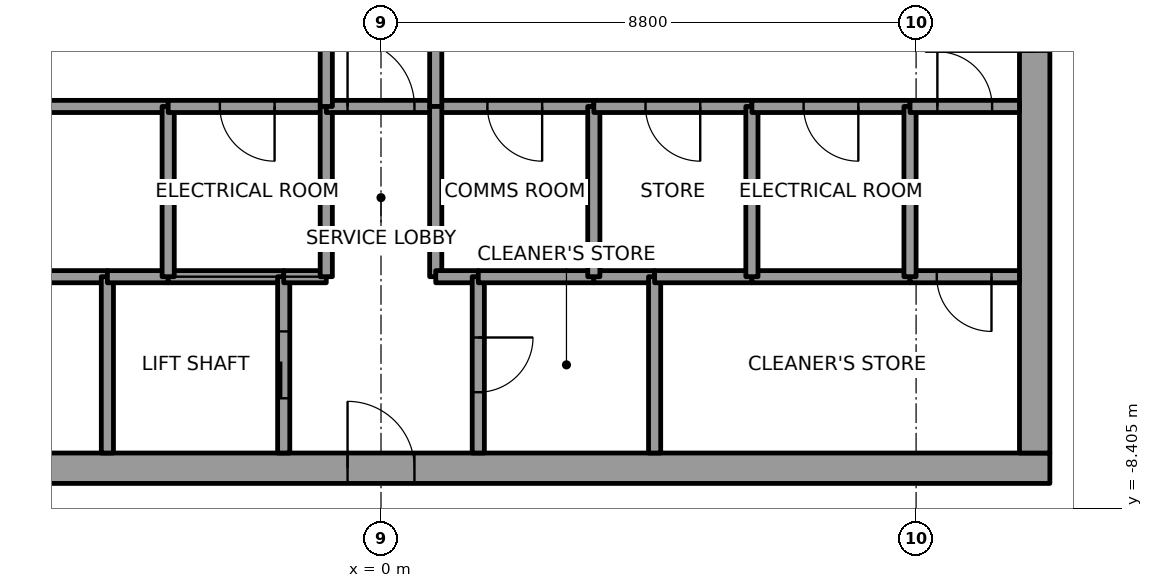
"""IFC4 building model, lengths in metres.
Left out: names, types, materials, properties, quantities, classifications, styles, units other than length and angle.
Written with IfcOpenShell. Run it as: python <this file> out.ifc"""

import sys

from ifc_helpers import new_model, si_unit, direction, frame, frame_2d, origin, place, context, subcontext, project, spatial, rectangle, extrude, element, fill, save


model = new_model("IFC4")
c1 = context("Model", 3, precision=1e-05, world=origin(), true_north=direction((0.0, 1.0)))
c2 = subcontext(c1, "Body", "Model", "MODEL_VIEW")
j1 = project(units=[si_unit("LENGTHUNIT", "METRE"), si_unit("PLANEANGLEUNIT", "RADIAN")], contexts=[c1])
p1 = place(None, origin())
s1 = spatial("IfcSite", under=j1, at=p1, CompositionType="ELEMENT")
p2 = place(p1, origin())
s2 = spatial("IfcBuilding", under=s1, at=p2, CompositionType="ELEMENT")
p3 = place(p2, frame((0.0, 0.0, 355.6)))
s3 = spatial("IfcBuildingStorey", under=s2, at=p3, CompositionType="ELEMENT", Elevation=355.6)
p4 = place(p3, frame((-11.0, -7.75, 0.0), z_axis=(0.0, 0.0, 1.0), x_axis=(1.0, 0.0, 0.0)))
e1 = element("IfcWall", 1, at=p4, inside=s3, PredefinedType="SHEAR", context=c2, shape_type="SweptSolid", body=[
    extrude(rectangle(XDim=22.0, YDim=0.5, at=frame_2d((11.0, 0.0))), origin(), (0.0, 0.0, 1.0), 5.4),
])
p5 = place(p4, frame((10.45, 0.0, 0.0)))
e2 = element("IfcOpeningElement", 2, at=p5, cuts=e1, PredefinedType="OPENING", context=c2, shape_type="SweptSolid", body=[
    extrude(rectangle(XDim=1.1, YDim=2.1, at=frame_2d((0.55, 1.05))), frame((0.0, 0.25, 0.0), z_axis=(0.0, -1.0, 0.0), x_axis=(1.0, 0.0, 0.0)), (0.0, 0.0, 1.0), 0.5),
])
p6 = place(p3, frame((10.75, -7.5, 0.0), z_axis=(0.0, 0.0, 1.0), x_axis=(0.0, 1.0, 0.0)))
e3 = element("IfcWall", 3, at=p6, inside=s3, PredefinedType="SHEAR", context=c2, shape_type="SweptSolid", body=[
    extrude(rectangle(XDim=15.0, YDim=0.5, at=frame_2d((7.5, 0.0))), origin(), (0.0, 0.0, 1.0), 5.4),
])
p7 = place(p6, frame((6.6, 0.0, 0.0)))
e4 = element("IfcOpeningElement", 4, at=p7, cuts=e3, PredefinedType="OPENING", context=c2, shape_type="SweptSolid", body=[
    extrude(rectangle(XDim=1.8, YDim=2.1, at=frame_2d((0.9, 1.05))), frame((0.0, 0.25, 0.0), z_axis=(0.0, -1.0, 0.0), x_axis=(1.0, 0.0, 0.0)), (0.0, 0.0, 1.0), 0.5),
])
p8 = place(p3, frame((-8.7, -4.6, 0.0), z_axis=(0.0, 0.0, 1.0), x_axis=(1.0, 0.0, 0.0)))
e5 = element("IfcWall", 5, at=p8, inside=s3, PredefinedType="SOLIDWALL", context=c2, shape_type="SweptSolid", body=[
    extrude(rectangle(XDim=4.2, YDim=0.2, at=frame_2d((2.1, 0.0))), origin(), (0.0, 0.0, 1.0), 5.25),
])
p9 = place(p3, frame((-3.5, -1.8, 0.0), z_axis=(0.0, 0.0, 1.0), x_axis=(-1.0, 0.0, 0.0)))
e6 = element("IfcWall", 6, at=p9, inside=s3, PredefinedType="SOLIDWALL", context=c2, shape_type="SweptSolid", body=[
    extrude(rectangle(XDim=5.2, YDim=0.2, at=frame_2d((2.6, 0.0))), origin(), (0.0, 0.0, 1.0), 5.25),
])
p10 = place(p9, frame((2.15, 0.0, 0.0)))
e7 = element("IfcOpeningElement", 7, at=p10, cuts=e6, PredefinedType="OPENING", context=c2, shape_type="SweptSolid", body=[
    extrude(rectangle(XDim=0.9, YDim=2.1, at=frame_2d((0.45, 1.05))), frame((0.0, 0.1, 0.0), z_axis=(0.0, -1.0, 0.0), x_axis=(1.0, 0.0, 0.0)), (0.0, 0.0, 1.0), 0.2),
])
p11 = place(p3, frame((-4.5, -4.6, 0.0), z_axis=(0.0, 0.0, 1.0), x_axis=(0.0, -1.0, 0.0)))
e8 = element("IfcWall", 8, at=p11, inside=s3, PredefinedType="SOLIDWALL", context=c2, shape_type="SweptSolid", body=[
    extrude(rectangle(XDim=2.9, YDim=0.2, at=frame_2d((1.45, 0.0))), origin(), (0.0, 0.0, 1.0), 5.25),
])
p12 = place(p3, frame((-4.5, -4.6, 0.0), z_axis=(0.0, 0.0, 1.0), x_axis=(1.0, 0.0, 0.0)))
e9 = element("IfcWall", 9, at=p12, inside=s3, PredefinedType="SOLIDWALL", context=c2, shape_type="SweptSolid", body=[
    extrude(rectangle(XDim=1.0, YDim=0.2, at=frame_2d((0.5, 0.0))), origin(), (0.0, 0.0, 1.0), 5.25),
])
p13 = place(p3, frame((-3.5, -4.6, 0.0), z_axis=(0.0, 0.0, 1.0), x_axis=(1.0, 0.0, 0.0)))
e10 = element("IfcWall", 10, at=p13, inside=s3, PredefinedType="SOLIDWALL", context=c2, shape_type="SweptSolid", body=[
    extrude(rectangle(XDim=1.9, YDim=0.2, at=frame_2d((0.95, 0.0))), origin(), (0.0, 0.0, 1.0), 5.25),
])
p14 = place(p3, frame((-3.5, -4.6, 0.0), z_axis=(0.0, 0.0, 1.0), x_axis=(0.0, 1.0, 0.0)))
e11 = element("IfcWall", 11, at=p14, inside=s3, PredefinedType="SOLIDWALL", context=c2, shape_type="SweptSolid", body=[
    extrude(rectangle(XDim=2.8, YDim=0.2, at=frame_2d((1.4, 0.0))), origin(), (0.0, 0.0, 1.0), 5.25),
])
p15 = place(p3, frame((-0.9, -1.8, 0.0), z_axis=(0.0, 0.0, 1.0), x_axis=(-1.0, 0.0, 0.0)))
e12 = element("IfcWall", 12, at=p15, inside=s3, PredefinedType="SOLIDWALL", context=c2, shape_type="SweptSolid", body=[
    extrude(rectangle(XDim=2.6, YDim=0.2, at=frame_2d((1.3, 0.0))), origin(), (0.0, 0.0, 1.0), 5.25),
])
p16 = place(p15, frame((0.85, 0.0, 0.0)))
e13 = element("IfcOpeningElement", 13, at=p16, cuts=e12, PredefinedType="OPENING", context=c2, shape_type="SweptSolid", body=[
    extrude(rectangle(XDim=0.9, YDim=2.1, at=frame_2d((0.45, 1.05))), frame((0.0, 0.1, 0.0), z_axis=(0.0, -1.0, 0.0), x_axis=(1.0, 0.0, 0.0)), (0.0, 0.0, 1.0), 0.2),
])
p17 = place(p3, frame((-1.6, -7.5, 0.0), z_axis=(0.0, 0.0, 1.0), x_axis=(0.0, 1.0, 0.0)))
e14 = element("IfcWall", 14, at=p17, inside=s3, PredefinedType="SOLIDWALL", context=c2, shape_type="SweptSolid", body=[
    extrude(rectangle(XDim=2.9, YDim=0.2, at=frame_2d((1.45, 0.0))), origin(), (0.0, 0.0, 1.0), 5.25),
])
p18 = place(p17, frame((0.9, 0.0, 0.0)))
e15 = element("IfcOpeningElement", 15, at=p18, cuts=e14, PredefinedType="OPENING", context=c2, shape_type="SweptSolid", body=[
    extrude(rectangle(XDim=1.1, YDim=2.1, at=frame_2d((0.55, 1.05))), frame((0.0, 0.1, 0.0), z_axis=(0.0, -1.0, 0.0), x_axis=(1.0, 0.0, 0.0)), (0.0, 0.0, 1.0), 0.2),
])
p19 = place(p3, frame((-1.6, -4.6, 0.0), z_axis=(0.0, 0.0, 1.0), x_axis=(1.0, 0.0, 0.0)))
e16 = element("IfcWall", 16, at=p19, inside=s3, PredefinedType="SOLIDWALL", context=c2, shape_type="SweptSolid", body=[
    extrude(rectangle(XDim=0.7, YDim=0.2, at=frame_2d((0.35, 0.0))), origin(), (0.0, 0.0, 1.0), 5.25),
])
p20 = place(p3, frame((-0.9, -4.6, 0.0), z_axis=(0.0, 0.0, 1.0), x_axis=(0.0, 1.0, 0.0)))
e17 = element("IfcWall", 17, at=p20, inside=s3, PredefinedType="SOLIDWALL", context=c2, shape_type="SweptSolid", body=[
    extrude(rectangle(XDim=2.8, YDim=0.2, at=frame_2d((1.4, 0.0))), origin(), (0.0, 0.0, 1.0), 5.25),
])
p21 = place(p3, frame((-0.9, -1.8, 0.0), z_axis=(0.0, 0.0, 1.0), x_axis=(1.0, 0.0, 0.0)))
e18 = element("IfcWall", 18, at=p21, inside=s3, PredefinedType="SOLIDWALL", context=c2, shape_type="SweptSolid", body=[
    extrude(rectangle(XDim=1.8, YDim=0.2, at=frame_2d((0.9, 0.0))), origin(), (0.0, 0.0, 1.0), 5.25),
])
p22 = place(p21, frame((0.35, 0.0, 0.0)))
e19 = element("IfcOpeningElement", 19, at=p22, cuts=e18, PredefinedType="OPENING", context=c2, shape_type="SweptSolid", body=[
    extrude(rectangle(XDim=1.1, YDim=2.1, at=frame_2d((0.55, 1.05))), frame((0.0, 0.1, 0.0), z_axis=(0.0, -1.0, 0.0), x_axis=(1.0, 0.0, 0.0)), (0.0, 0.0, 1.0), 0.2),
])
p23 = place(p3, frame((-0.9, 1.8, 0.0), z_axis=(0.0, 0.0, 1.0), x_axis=(0.0, -1.0, 0.0)))
e20 = element("IfcWall", 20, at=p23, inside=s3, PredefinedType="SOLIDWALL", context=c2, shape_type="SweptSolid", body=[
    extrude(rectangle(XDim=3.6, YDim=0.2, at=frame_2d((1.8, 0.0))), origin(), (0.0, 0.0, 1.0), 5.25),
])
p24 = place(p23, frame((1.05, 0.0, 0.0)))
e21 = element("IfcOpeningElement", 21, at=p24, cuts=e20, PredefinedType="OPENING", context=c2, shape_type="SweptSolid", body=[
    extrude(rectangle(XDim=1.5, YDim=2.1, at=frame_2d((0.75, 1.05))), frame((0.0, 0.1, 0.0), z_axis=(0.0, -1.0, 0.0), x_axis=(1.0, 0.0, 0.0)), (0.0, 0.0, 1.0), 0.2),
])
p25 = place(p3, frame((3.5, -1.8, 0.0), z_axis=(0.0, 0.0, 1.0), x_axis=(-1.0, 0.0, 0.0)))
e22 = element("IfcWall", 22, at=p25, inside=s3, PredefinedType="SOLIDWALL", context=c2, shape_type="SweptSolid", body=[
    extrude(rectangle(XDim=2.6, YDim=0.2, at=frame_2d((1.3, 0.0))), origin(), (0.0, 0.0, 1.0), 5.25),
])
p26 = place(p25, frame((0.85, 0.0, 0.0)))
e23 = element("IfcOpeningElement", 23, at=p26, cuts=e22, PredefinedType="OPENING", context=c2, shape_type="SweptSolid", body=[
    extrude(rectangle(XDim=0.9, YDim=2.1, at=frame_2d((0.45, 1.05))), frame((0.0, 0.1, 0.0), z_axis=(0.0, -1.0, 0.0), x_axis=(1.0, 0.0, 0.0)), (0.0, 0.0, 1.0), 0.2),
])
p27 = place(p3, frame((0.9, -1.8, 0.0), z_axis=(0.0, 0.0, 1.0), x_axis=(0.0, 1.0, 0.0)))
e24 = element("IfcWall", 24, at=p27, inside=s3, PredefinedType="SOLIDWALL", context=c2, shape_type="SweptSolid", body=[
    extrude(rectangle(XDim=3.6, YDim=0.2, at=frame_2d((1.8, 0.0))), origin(), (0.0, 0.0, 1.0), 5.25),
])
p28 = place(p27, frame((1.05, 0.0, 0.0)))
e25 = element("IfcOpeningElement", 25, at=p28, cuts=e24, PredefinedType="OPENING", context=c2, shape_type="SweptSolid", body=[
    extrude(rectangle(XDim=1.5, YDim=2.1, at=frame_2d((0.75, 1.05))), frame((0.0, 0.1, 0.0), z_axis=(0.0, -1.0, 0.0), x_axis=(1.0, 0.0, 0.0)), (0.0, 0.0, 1.0), 0.2),
])
p29 = place(p3, frame((0.9, -1.8, 0.0), z_axis=(0.0, 0.0, 1.0), x_axis=(0.0, -1.0, 0.0)))
e26 = element("IfcWall", 26, at=p29, inside=s3, PredefinedType="SOLIDWALL", context=c2, shape_type="SweptSolid", body=[
    extrude(rectangle(XDim=2.8, YDim=0.2, at=frame_2d((1.4, 0.0))), origin(), (0.0, 0.0, 1.0), 5.25),
])
p30 = place(p3, frame((0.9, -4.6, 0.0), z_axis=(0.0, 0.0, 1.0), x_axis=(1.0, 0.0, 0.0)))
e27 = element("IfcWall", 27, at=p30, inside=s3, PredefinedType="SOLIDWALL", context=c2, shape_type="SweptSolid", body=[
    extrude(rectangle(XDim=0.7, YDim=0.2, at=frame_2d((0.35, 0.0))), origin(), (0.0, 0.0, 1.0), 5.25),
])
p31 = place(p3, frame((1.6, -4.6, 0.0), z_axis=(0.0, 0.0, 1.0), x_axis=(0.0, -1.0, 0.0)))
e28 = element("IfcWall", 28, at=p31, inside=s3, PredefinedType="SOLIDWALL", context=c2, shape_type="SweptSolid", body=[
    extrude(rectangle(XDim=2.9, YDim=0.2, at=frame_2d((1.45, 0.0))), origin(), (0.0, 0.0, 1.0), 5.25),
])
p32 = place(p31, frame((1.0, 0.0, 0.0)))
e29 = element("IfcOpeningElement", 29, at=p32, cuts=e28, PredefinedType="OPENING", context=c2, shape_type="SweptSolid", body=[
    extrude(rectangle(XDim=0.9, YDim=2.1, at=frame_2d((0.45, 1.05))), frame((0.0, 0.1, 0.0), z_axis=(0.0, -1.0, 0.0), x_axis=(1.0, 0.0, 0.0)), (0.0, 0.0, 1.0), 0.2),
])
p33 = place(p3, frame((1.6, -4.6, 0.0), z_axis=(0.0, 0.0, 1.0), x_axis=(1.0, 0.0, 0.0)))
e30 = element("IfcWall", 30, at=p33, inside=s3, PredefinedType="SOLIDWALL", context=c2, shape_type="SweptSolid", body=[
    extrude(rectangle(XDim=1.9, YDim=0.2, at=frame_2d((0.95, 0.0))), origin(), (0.0, 0.0, 1.0), 5.25),
])
p34 = place(p3, frame((3.5, -4.6, 0.0), z_axis=(0.0, 0.0, 1.0), x_axis=(1.0, 0.0, 0.0)))
e31 = element("IfcWall", 31, at=p34, inside=s3, PredefinedType="SOLIDWALL", context=c2, shape_type="SweptSolid", body=[
    extrude(rectangle(XDim=1.0, YDim=0.2, at=frame_2d((0.5, 0.0))), origin(), (0.0, 0.0, 1.0), 5.25),
])
p35 = place(p3, frame((3.5, -4.6, 0.0), z_axis=(0.0, 0.0, 1.0), x_axis=(0.0, 1.0, 0.0)))
e32 = element("IfcWall", 32, at=p35, inside=s3, PredefinedType="SOLIDWALL", context=c2, shape_type="SweptSolid", body=[
    extrude(rectangle(XDim=2.8, YDim=0.2, at=frame_2d((1.4, 0.0))), origin(), (0.0, 0.0, 1.0), 5.25),
])
p36 = place(p3, frame((6.1, -1.8, 0.0), z_axis=(0.0, 0.0, 1.0), x_axis=(-1.0, 0.0, 0.0)))
e33 = element("IfcWall", 33, at=p36, inside=s3, PredefinedType="SOLIDWALL", context=c2, shape_type="SweptSolid", body=[
    extrude(rectangle(XDim=2.6, YDim=0.2, at=frame_2d((1.3, 0.0))), origin(), (0.0, 0.0, 1.0), 5.25),
])
p37 = place(p36, frame((0.85, 0.0, 0.0)))
e34 = element("IfcOpeningElement", 34, at=p37, cuts=e33, PredefinedType="OPENING", context=c2, shape_type="SweptSolid", body=[
    extrude(rectangle(XDim=0.9, YDim=2.1, at=frame_2d((0.45, 1.05))), frame((0.0, 0.1, 0.0), z_axis=(0.0, -1.0, 0.0), x_axis=(1.0, 0.0, 0.0)), (0.0, 0.0, 1.0), 0.2),
])
p38 = place(p3, frame((4.5, -4.6, 0.0), z_axis=(0.0, 0.0, 1.0), x_axis=(0.0, -1.0, 0.0)))
e35 = element("IfcWall", 35, at=p38, inside=s3, PredefinedType="SOLIDWALL", context=c2, shape_type="SweptSolid", body=[
    extrude(rectangle(XDim=2.9, YDim=0.2, at=frame_2d((1.45, 0.0))), origin(), (0.0, 0.0, 1.0), 5.25),
])
p39 = place(p3, frame((4.5, -4.6, 0.0), z_axis=(0.0, 0.0, 1.0), x_axis=(1.0, 0.0, 0.0)))
e36 = element("IfcWall", 36, at=p39, inside=s3, PredefinedType="SOLIDWALL", context=c2, shape_type="SweptSolid", body=[
    extrude(rectangle(XDim=1.6, YDim=0.2, at=frame_2d((0.8, 0.0))), origin(), (0.0, 0.0, 1.0), 5.25),
])
p40 = place(p3, frame((6.1, -4.6, 0.0), z_axis=(0.0, 0.0, 1.0), x_axis=(1.0, 0.0, 0.0)))
e37 = element("IfcWall", 37, at=p40, inside=s3, PredefinedType="SOLIDWALL", context=c2, shape_type="SweptSolid", body=[
    extrude(rectangle(XDim=2.6, YDim=0.2, at=frame_2d((1.3, 0.0))), origin(), (0.0, 0.0, 1.0), 5.25),
])
p41 = place(p3, frame((6.1, -4.6, 0.0), z_axis=(0.0, 0.0, 1.0), x_axis=(0.0, 1.0, 0.0)))
e38 = element("IfcWall", 38, at=p41, inside=s3, PredefinedType="SOLIDWALL", context=c2, shape_type="SweptSolid", body=[
    extrude(rectangle(XDim=2.8, YDim=0.2, at=frame_2d((1.4, 0.0))), origin(), (0.0, 0.0, 1.0), 5.25),
])
p42 = place(p3, frame((8.7, -1.8, 0.0), z_axis=(0.0, 0.0, 1.0), x_axis=(-1.0, 0.0, 0.0)))
e39 = element("IfcWall", 39, at=p42, inside=s3, PredefinedType="SOLIDWALL", context=c2, shape_type="SweptSolid", body=[
    extrude(rectangle(XDim=2.6, YDim=0.2, at=frame_2d((1.3, 0.0))), origin(), (0.0, 0.0, 1.0), 5.25),
])
p43 = place(p42, frame((0.85, 0.0, 0.0)))
e40 = element("IfcOpeningElement", 40, at=p43, cuts=e39, PredefinedType="OPENING", context=c2, shape_type="SweptSolid", body=[
    extrude(rectangle(XDim=0.9, YDim=2.1, at=frame_2d((0.45, 1.05))), frame((0.0, 0.1, 0.0), z_axis=(0.0, -1.0, 0.0), x_axis=(1.0, 0.0, 0.0)), (0.0, 0.0, 1.0), 0.2),
])
p44 = place(p3, frame((10.5, -4.6, 0.0), z_axis=(0.0, 0.0, 1.0), x_axis=(-1.0, 0.0, 0.0)))
e41 = element("IfcWall", 41, at=p44, inside=s3, PredefinedType="SOLIDWALL", context=c2, shape_type="SweptSolid", body=[
    extrude(rectangle(XDim=1.8, YDim=0.2, at=frame_2d((0.9, 0.0))), origin(), (0.0, 0.0, 1.0), 5.25),
])
p45 = place(p44, frame((0.46, 0.0, 0.0)))
e42 = element("IfcOpeningElement", 42, at=p45, cuts=e41, PredefinedType="OPENING", context=c2, shape_type="SweptSolid", body=[
    extrude(rectangle(XDim=0.9, YDim=2.1, at=frame_2d((0.45, 1.05))), frame((0.0, 0.1, 0.0), z_axis=(0.0, -1.0, 0.0), x_axis=(1.0, 0.0, 0.0)), (0.0, 0.0, 1.0), 0.2),
])
p46 = place(p3, frame((8.7, -4.6, 0.0), z_axis=(0.0, 0.0, 1.0), x_axis=(0.0, 1.0, 0.0)))
e43 = element("IfcWall", 43, at=p46, inside=s3, PredefinedType="SOLIDWALL", context=c2, shape_type="SweptSolid", body=[
    extrude(rectangle(XDim=2.8, YDim=0.2, at=frame_2d((1.4, 0.0))), origin(), (0.0, 0.0, 1.0), 5.25),
])
p47 = place(p3, frame((8.7, -1.8, 0.0), z_axis=(0.0, 0.0, 1.0), x_axis=(1.0, 0.0, 0.0)))
e44 = element("IfcWall", 44, at=p47, inside=s3, PredefinedType="SOLIDWALL", context=c2, shape_type="SweptSolid", body=[
    extrude(rectangle(XDim=1.8, YDim=0.2, at=frame_2d((0.9, 0.0))), origin(), (0.0, 0.0, 1.0), 5.25),
])
p48 = place(p47, frame((0.45, 0.0, 0.0)))
e45 = element("IfcOpeningElement", 45, at=p48, cuts=e44, PredefinedType="OPENING", context=c2, shape_type="SweptSolid", body=[
    extrude(rectangle(XDim=0.9, YDim=2.1, at=frame_2d((0.45, 1.05))), frame((0.0, 0.1, 0.0), z_axis=(0.0, -1.0, 0.0), x_axis=(1.0, 0.0, 0.0)), (0.0, 0.0, 1.0), 0.2),
])
p49 = place(p18, origin())
e46 = element("IfcDoor", 46, at=p49, inside=s3, OperationType="SLIDING_TO_RIGHT", PredefinedType="DOOR", context=c2, shape_type="SweptSolid", body=[
    extrude(rectangle(XDim=1.1, YDim=2.1, at=frame_2d((0.55, 1.05))), frame((0.0, 0.025, 0.0), z_axis=(0.0, -1.0, 0.0), x_axis=(1.0, 0.0, 0.0)), (0.0, 0.0, 1.0), 0.05),
])
fill(e15, e46)
p50 = place(p22, origin())
e47 = element("IfcDoor", 47, at=p50, inside=s3, OperationType="SINGLE_SWING_RIGHT", PredefinedType="DOOR", context=c2, shape_type="SweptSolid", body=[
    extrude(rectangle(XDim=1.1, YDim=2.1, at=frame_2d((0.55, 1.05))), frame((0.0, 0.025, 0.0), z_axis=(0.0, -1.0, 0.0), x_axis=(1.0, 0.0, 0.0)), (0.0, 0.0, 1.0), 0.05),
])
fill(e19, e47)
p51 = place(p16, origin())
e48 = element("IfcDoor", 48, at=p51, inside=s3, OperationType="SINGLE_SWING_LEFT", PredefinedType="DOOR", context=c2, shape_type="SweptSolid", body=[
    extrude(rectangle(XDim=0.9, YDim=2.1, at=frame_2d((0.45, 1.05))), frame((0.0, 0.025, 0.0), z_axis=(0.0, -1.0, 0.0), x_axis=(1.0, 0.0, 0.0)), (0.0, 0.0, 1.0), 0.05),
])
fill(e13, e48)
p52 = place(p26, origin())
e49 = element("IfcDoor", 49, at=p52, inside=s3, OperationType="SINGLE_SWING_LEFT", PredefinedType="DOOR", context=c2, shape_type="SweptSolid", body=[
    extrude(rectangle(XDim=0.9, YDim=2.1, at=frame_2d((0.45, 1.05))), frame((0.0, 0.025, 0.0), z_axis=(0.0, -1.0, 0.0), x_axis=(1.0, 0.0, 0.0)), (0.0, 0.0, 1.0), 0.05),
])
fill(e23, e49)
p53 = place(p37, origin())
e50 = element("IfcDoor", 50, at=p53, inside=s3, OperationType="SINGLE_SWING_LEFT", PredefinedType="DOOR", context=c2, shape_type="SweptSolid", body=[
    extrude(rectangle(XDim=0.9, YDim=2.1, at=frame_2d((0.45, 1.05))), frame((0.0, 0.025, 0.0), z_axis=(0.0, -1.0, 0.0), x_axis=(1.0, 0.0, 0.0)), (0.0, 0.0, 1.0), 0.05),
])
fill(e34, e50)
p54 = place(p43, origin())
e51 = element("IfcDoor", 51, at=p54, inside=s3, OperationType="SINGLE_SWING_LEFT", PredefinedType="DOOR", context=c2, shape_type="SweptSolid", body=[
    extrude(rectangle(XDim=0.9, YDim=2.1, at=frame_2d((0.45, 1.05))), frame((0.0, 0.025, 0.0), z_axis=(0.0, -1.0, 0.0), x_axis=(1.0, 0.0, 0.0)), (0.0, 0.0, 1.0), 0.05),
])
fill(e40, e51)
p55 = place(p45, origin())
e52 = element("IfcDoor", 52, at=p55, inside=s3, OperationType="SINGLE_SWING_RIGHT", PredefinedType="DOOR", context=c2, shape_type="SweptSolid", body=[
    extrude(rectangle(XDim=0.9, YDim=2.1, at=frame_2d((0.45, 1.05))), frame((0.0, 0.025, 0.0), z_axis=(0.0, -1.0, 0.0), x_axis=(1.0, 0.0, 0.0)), (0.0, 0.0, 1.0), 0.05),
])
fill(e42, e52)
p56 = place(p48, origin())
e53 = element("IfcDoor", 53, at=p56, inside=s3, OperationType="SINGLE_SWING_RIGHT", PredefinedType="DOOR", context=c2, shape_type="SweptSolid", body=[
    extrude(rectangle(XDim=0.9, YDim=2.1, at=frame_2d((0.45, 1.05))), frame((0.0, 0.025, 0.0), z_axis=(0.0, -1.0, 0.0), x_axis=(1.0, 0.0, 0.0)), (0.0, 0.0, 1.0), 0.05),
])
fill(e45, e53)
p57 = place(p32, origin())
e54 = element("IfcDoor", 54, at=p57, inside=s3, OperationType="SINGLE_SWING_RIGHT", PredefinedType="DOOR", context=c2, shape_type="SweptSolid", body=[
    extrude(rectangle(XDim=0.9, YDim=2.1, at=frame_2d((0.45, 1.05))), frame((0.0, 0.025, 0.0), z_axis=(0.0, -1.0, 0.0), x_axis=(1.0, 0.0, 0.0)), (0.0, 0.0, 1.0), 0.05),
])
fill(e29, e54)
p58 = place(p7, origin())
e55 = element("IfcDoor", 55, at=p58, inside=s3, OperationType="DOUBLE_DOOR_SINGLE_SWING", PredefinedType="DOOR", context=c2, shape_type="SweptSolid", body=[
    extrude(rectangle(XDim=1.8, YDim=2.1, at=frame_2d((0.9, 1.05))), frame((0.0, 0.025, 0.0), z_axis=(0.0, -1.0, 0.0), x_axis=(1.0, 0.0, 0.0)), (0.0, 0.0, 1.0), 0.05),
])
fill(e4, e55)
p59 = place(p5, origin())
e56 = element("IfcDoor", 56, at=p59, inside=s3, OperationType="SINGLE_SWING_RIGHT", PredefinedType="DOOR", context=c2, shape_type="SweptSolid", body=[
    extrude(rectangle(XDim=1.1, YDim=2.1, at=frame_2d((0.55, 1.05))), frame((0.0, 0.025, 0.0), z_axis=(0.0, -1.0, 0.0), x_axis=(1.0, 0.0, 0.0)), (0.0, 0.0, 1.0), 0.05),
])
fill(e2, e56)
save(model, sys.argv[1])
